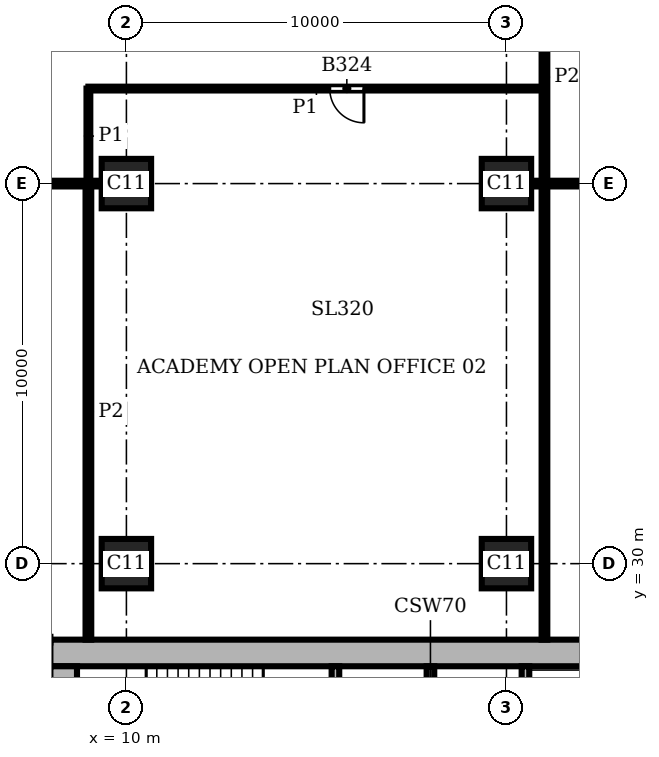
"""IFC4 building model, lengths in metres.
Left out: names, types, materials, properties, quantities, classifications, styles, units other than length and angle.
Written with IfcOpenShell. Run it as: python <this file> out.ifc"""

import sys

from ifc_helpers import new_model, si_unit, direction, frame, frame_2d, origin, origin_2d, place, context, subcontext, project, spatial, rectangle, extrude, element, fill, save


model = new_model("IFC4")
c1 = context("Model", 3, precision=1e-05, world=origin(), true_north=direction((0.0, 1.0)))
c2 = subcontext(c1, "Body", "Model", "MODEL_VIEW")
j1 = project(units=[si_unit("LENGTHUNIT", "METRE"), si_unit("PLANEANGLEUNIT", "RADIAN")], contexts=[c1])
p1 = place(None, origin())
s1 = spatial("IfcSite", under=j1, at=p1, CompositionType="ELEMENT")
p2 = place(p1, origin())
s2 = spatial("IfcBuilding", under=s1, at=p2, CompositionType="ELEMENT")
p3 = place(p2, frame((0.0, 0.0, 155.1)))
s3 = spatial("IfcBuildingStorey", under=s2, at=p3, CompositionType="ELEMENT", Elevation=155.1)
for number, where, z_axis, x_axis in (
    (1, (10.0, 30.0, 0.0), (0.0, 0.0, 1.0), (1.0, 0.0, 0.0)),
    (2, (10.0, 40.0, 0.0), (0.0, 0.0, 1.0), (1.0, 0.0, 0.0)),
    (3, (20.0, 30.0, 0.0), (0.0, 0.0, 1.0), (1.0, 0.0, 0.0)),
    (4, (20.0, 40.0, 0.0), (0.0, 0.0, 1.0), (1.0, 0.0, 0.0)),
):
    element("IfcColumn", number, at=place(p3, frame(where, z_axis=z_axis, x_axis=x_axis)), inside=s3, PredefinedType="COLUMN", context=c2, shape_type="SweptSolid", body=[
        extrude(rectangle(XDim=1.3, YDim=1.3, at=origin_2d()), origin(), (0.0, 0.0, 1.0), 3.9),
    ])
p4 = place(p3, frame((28.0, 27.65, 0.0), z_axis=(0.0, 0.0, 1.0), x_axis=(-1.0, 0.0, 0.0)))
e5 = element("IfcWall", 5, at=p4, inside=s3, PredefinedType="SHEAR", context=c2, shape_type="SweptSolid", body=[
    extrude(rectangle(XDim=20.0, YDim=0.7, at=frame_2d((10.0, 0.0))), origin(), (0.0, 0.0, 1.0), 3.9),
])
p5 = place(p3, frame((8.35, 27.3, 0.0), z_axis=(0.0, 0.0, 1.0), x_axis=(0.0, -1.0, 0.0)))
e6 = element("IfcWall", 6, at=p5, inside=s3, PredefinedType="SHEAR", context=c2, shape_type="SweptSolid", body=[
    extrude(rectangle(XDim=18.6, YDim=0.7, at=frame_2d((9.3, 0.0))), origin(), (0.0, 0.0, 1.0), 3.9),
])
p6 = place(p3, frame((15.5, 23.6, 0.0), z_axis=(0.0, 0.0, 1.0), x_axis=(0.0, 1.0, 0.0)))
e7 = element("IfcWall", 7, at=p6, inside=s3, PredefinedType="SHEAR", context=c2, shape_type="SweptSolid", body=[
    extrude(rectangle(XDim=3.7, YDim=0.2, at=frame_2d((1.85, 0.0))), origin(), (0.0, 0.0, 1.0), 3.58),
])
p7 = place(p3, frame((18.0, 20.0, 0.0), z_axis=(0.0, 0.0, 1.0), x_axis=(0.0, 1.0, 0.0)))
e8 = element("IfcWall", 8, at=p7, inside=s3, PredefinedType="SHEAR", context=c2, shape_type="SweptSolid", body=[
    extrude(rectangle(XDim=7.3, YDim=0.2, at=frame_2d((3.65, 0.0))), origin(), (0.0, 0.0, 1.0), 3.58),
])
p8 = place(p7, frame((1.2, 0.0, 0.0)))
e9 = element("IfcOpeningElement", 9, at=p8, cuts=e8, PredefinedType="OPENING", context=c2, shape_type="SweptSolid", body=[
    extrude(rectangle(XDim=1.2, YDim=2.1, at=frame_2d((0.6, 1.05))), frame((0.0, 0.11, 0.0), z_axis=(0.0, -1.0, 0.0), x_axis=(1.0, 0.0, 0.0)), (0.0, 0.0, 1.0), 0.22),
])
p9 = place(p3, frame((20.5, 23.6, 0.0), z_axis=(0.0, 0.0, 1.0), x_axis=(0.0, 1.0, 0.0)))
e10 = element("IfcWall", 10, at=p9, inside=s3, PredefinedType="SHEAR", context=c2, shape_type="SweptSolid", body=[
    extrude(rectangle(XDim=3.7, YDim=0.2, at=frame_2d((1.85, 0.0))), origin(), (0.0, 0.0, 1.0), 3.58),
])
p10 = place(p3, frame((9.0, 40.0, 0.0), z_axis=(0.0, 0.0, 1.0), x_axis=(0.0, 1.0, 0.0)))
e11 = element("IfcWall", 11, at=p10, inside=s3, PredefinedType="PARTITIONING", context=c2, shape_type="SweptSolid", body=[
    extrude(rectangle(XDim=2.5, YDim=0.1, at=frame_2d((1.25, 0.0))), origin(), (0.0, 0.0, 1.0), 3.58),
])
p11 = place(p3, frame((9.0, 42.5, 0.0), z_axis=(0.0, 0.0, 1.0), x_axis=(1.0, 0.0, 0.0)))
e12 = element("IfcWall", 12, at=p11, inside=s3, PredefinedType="PARTITIONING", context=c2, shape_type="SweptSolid", body=[
    extrude(rectangle(XDim=12.0, YDim=0.1, at=frame_2d((6.0, 0.0))), origin(), (0.0, 0.0, 1.0), 3.58),
])
p12 = place(p11, frame((6.35, 0.0, 0.0)))
e13 = element("IfcOpeningElement", 13, at=p12, cuts=e12, PredefinedType="OPENING", context=c2, shape_type="SweptSolid", body=[
    extrude(rectangle(XDim=0.9, YDim=2.1, at=frame_2d((0.45, 1.05))), frame((0.0, 0.06, 0.0), z_axis=(0.0, -1.0, 0.0), x_axis=(1.0, 0.0, 0.0)), (0.0, 0.0, 1.0), 0.12),
])
p13 = place(p3, frame((9.0, 28.0, 0.0), z_axis=(0.0, 0.0, 1.0), x_axis=(0.0, 1.0, 0.0)))
e14 = element("IfcWall", 14, at=p13, inside=s3, PredefinedType="PARTITIONING", context=c2, shape_type="SweptSolid", body=[
    extrude(rectangle(XDim=12.0, YDim=0.15, at=frame_2d((6.0, 0.0))), origin(), (0.0, 0.0, 1.0), 3.58),
])
p14 = place(p3, frame((21.0, 28.0, 0.0), z_axis=(0.0, 0.0, 1.0), x_axis=(0.0, 1.0, 0.0)))
e15 = element("IfcWall", 15, at=p14, inside=s3, PredefinedType="PARTITIONING", context=c2, shape_type="SweptSolid", body=[
    extrude(rectangle(XDim=29.6, YDim=0.15, at=frame_2d((14.8, 0.0))), origin(), (0.0, 0.0, 1.0), 3.58),
])
p15 = place(p3, frame((0.45, 40.0, 0.0), z_axis=(0.0, 0.0, 1.0), x_axis=(1.0, 0.0, 0.0)))
e16 = element("IfcWall", 16, at=p15, inside=s3, PredefinedType="PARTITIONING", context=c2, shape_type="SweptSolid", body=[
    extrude(rectangle(XDim=8.9, YDim=0.15, at=frame_2d((4.45, 0.0))), origin(), (0.0, 0.0, 1.0), 3.58),
])
p16 = place(p3, frame((20.65, 40.0, 0.0), z_axis=(0.0, 0.0, 1.0), x_axis=(1.0, 0.0, 0.0)))
e17 = element("IfcWall", 17, at=p16, inside=s3, PredefinedType="PARTITIONING", context=c2, shape_type="SweptSolid", body=[
    extrude(rectangle(XDim=5.35, YDim=0.15, at=frame_2d((2.675, 0.0))), origin(), (0.0, 0.0, 1.0), 3.58),
])
p17 = place(p12, frame((0.9, 0.0, 0.0), z_axis=(0.0, 0.0, 1.0), x_axis=(-1.0, 0.0, 0.0)))
e18 = element("IfcDoor", 18, at=p17, inside=s3, OperationType="SINGLE_SWING_LEFT", PredefinedType="DOOR", context=c2, shape_type="SweptSolid", body=[
    extrude(rectangle(XDim=0.9, YDim=2.1, at=frame_2d((0.45, 1.05))), frame((0.0, 0.025, 0.0), z_axis=(0.0, -1.0, 0.0), x_axis=(1.0, 0.0, 0.0)), (0.0, 0.0, 1.0), 0.05),
])
fill(e13, e18)
save(model, sys.argv[1])
